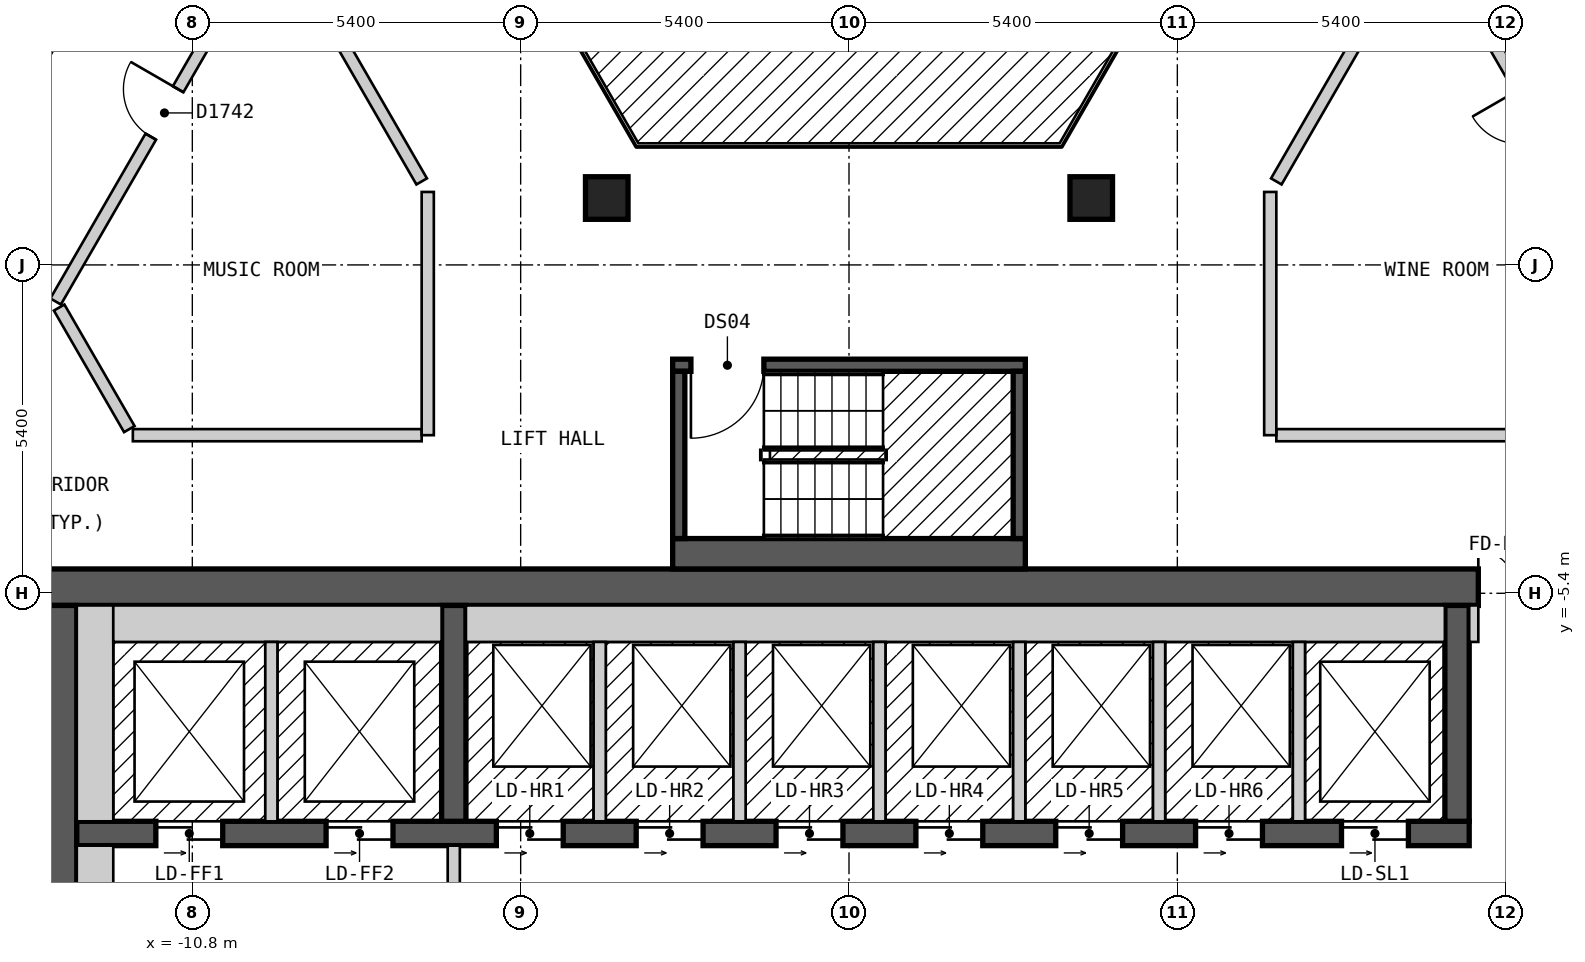
"""IFC4 building model, lengths in metres.
Left out: names, types, materials, properties, quantities, classifications, styles, units other than length and angle.
Written with IfcOpenShell. Run it as: python <this file> out.ifc"""

import sys

from ifc_helpers import new_model, si_unit, direction, frame, frame_2d, origin, origin_2d, place, context, subcontext, project, spatial, rectangle, extrude, element, fill, save


model = new_model("IFC4")
c1 = context("Model", 3, precision=1e-05, world=origin(), true_north=direction((0.0, 1.0)))
c2 = subcontext(c1, "Body", "Model", "MODEL_VIEW")
j1 = project(units=[si_unit("LENGTHUNIT", "METRE"), si_unit("PLANEANGLEUNIT", "RADIAN")], contexts=[c1])
p1 = place(None, origin())
s1 = spatial("IfcSite", under=j1, at=p1, CompositionType="ELEMENT")
p2 = place(p1, origin())
s2 = spatial("IfcBuilding", under=s1, at=p2, CompositionType="ELEMENT")
p3 = place(p2, frame((0.0, 0.0, 187.2)))
s3 = spatial("IfcBuildingStorey", under=s2, at=p3, CompositionType="ELEMENT", Elevation=187.2)
for number, where, z_axis, x_axis in (
    (1, (3.984, 1.1, 0.0), (0.0, 0.0, 1.0), (1.0, 0.0, 0.0)),
    (2, (-3.984, 1.1, 0.0), (0.0, 0.0, 1.0), (1.0, 0.0, 0.0)),
):
    element("IfcColumn", number, at=place(p3, frame(where, z_axis=z_axis, x_axis=x_axis)), inside=s3, PredefinedType="COLUMN", context=c2, shape_type="SweptSolid", body=[
        extrude(rectangle(XDim=0.7, YDim=0.7, at=origin_2d()), origin(), (0.0, 0.0, 1.0), 3.0),
    ])
p4 = place(p3, frame((-13.3, -5.3, 0.0), z_axis=(0.0, 0.0, 1.0), x_axis=(1.0, 0.0, 0.0)))
e3 = element("IfcWall", 3, at=p4, inside=s3, PredefinedType="SHEAR", context=c2, shape_type="SweptSolid", body=[
    extrude(rectangle(XDim=26.6, YDim=0.6, at=frame_2d((13.3, 0.0))), origin(), (0.0, 0.0, 1.0), 2.7),
])
p5 = place(p4, frame((23.65, 0.0, 0.0)))
e4 = element("IfcOpeningElement", 4, at=p5, cuts=e3, PredefinedType="OPENING", context=c2, shape_type="SweptSolid", body=[
    extrude(rectangle(XDim=1.2, YDim=2.1, at=frame_2d((0.6, 1.05))), frame((0.0, 0.31, 0.0), z_axis=(0.0, -1.0, 0.0), x_axis=(1.0, 0.0, 0.0)), (0.0, 0.0, 1.0), 0.62),
])
p6 = place(p3, frame((-13.0, -18.4, 0.0), z_axis=(0.0, 0.0, 1.0), x_axis=(0.0, 1.0, 0.0)))
e5 = element("IfcWall", 5, at=p6, inside=s3, PredefinedType="SHEAR", context=c2, shape_type="SweptSolid", body=[
    extrude(rectangle(XDim=12.8, YDim=0.6, at=frame_2d((6.4, 0.0))), origin(), (0.0, 0.0, 1.0), 2.7),
])
p7 = place(p6, frame((4.2, 0.0, 0.0)))
e6 = element("IfcOpeningElement", 6, at=p7, cuts=e5, PredefinedType="OPENING", context=c2, shape_type="SweptSolid", body=[
    extrude(rectangle(XDim=1.2, YDim=2.1, at=frame_2d((0.6, 1.05))), frame((0.0, 0.31, 0.0), z_axis=(0.0, -1.0, 0.0), x_axis=(1.0, 0.0, 0.0)), (0.0, 0.0, 1.0), 0.62),
])
p8 = place(p3, frame((-12.7, -9.35, 0.0), z_axis=(0.0, 0.0, 1.0), x_axis=(1.0, 0.0, 0.0)))
e7 = element("IfcWall", 7, at=p8, inside=s3, PredefinedType="SHEAR", context=c2, shape_type="SweptSolid", body=[
    extrude(rectangle(XDim=22.9, YDim=0.4, at=frame_2d((11.45, 0.0))), origin(), (0.0, 0.0, 1.0), 2.7),
])
p9 = place(p8, frame((1.3, 0.0, 0.0)))
e8 = element("IfcOpeningElement", 8, at=p9, cuts=e7, PredefinedType="OPENING", context=c2, shape_type="SweptSolid", body=[
    extrude(rectangle(XDim=1.1, YDim=2.1, at=frame_2d((0.55, 1.05))), frame((0.0, 0.21, 0.0), z_axis=(0.0, -1.0, 0.0), x_axis=(1.0, 0.0, 0.0)), (0.0, 0.0, 1.0), 0.42),
])
p10 = place(p8, frame((4.1, 0.0, 0.0)))
e9 = element("IfcOpeningElement", 9, at=p10, cuts=e7, PredefinedType="OPENING", context=c2, shape_type="SweptSolid", body=[
    extrude(rectangle(XDim=1.1, YDim=2.1, at=frame_2d((0.55, 1.05))), frame((0.0, 0.21, 0.0), z_axis=(0.0, -1.0, 0.0), x_axis=(1.0, 0.0, 0.0)), (0.0, 0.0, 1.0), 0.42),
])
p11 = place(p8, frame((6.9, 0.0, 0.0)))
e10 = element("IfcOpeningElement", 10, at=p11, cuts=e7, PredefinedType="OPENING", context=c2, shape_type="SweptSolid", body=[
    extrude(rectangle(XDim=1.1, YDim=2.1, at=frame_2d((0.55, 1.05))), frame((0.0, 0.21, 0.0), z_axis=(0.0, -1.0, 0.0), x_axis=(1.0, 0.0, 0.0)), (0.0, 0.0, 1.0), 0.42),
])
p12 = place(p8, frame((9.2, 0.0, 0.0)))
e11 = element("IfcOpeningElement", 11, at=p12, cuts=e7, PredefinedType="OPENING", context=c2, shape_type="SweptSolid", body=[
    extrude(rectangle(XDim=1.1, YDim=2.1, at=frame_2d((0.55, 1.05))), frame((0.0, 0.21, 0.0), z_axis=(0.0, -1.0, 0.0), x_axis=(1.0, 0.0, 0.0)), (0.0, 0.0, 1.0), 0.42),
])
p13 = place(p8, frame((11.5, 0.0, 0.0)))
e12 = element("IfcOpeningElement", 12, at=p13, cuts=e7, PredefinedType="OPENING", context=c2, shape_type="SweptSolid", body=[
    extrude(rectangle(XDim=1.1, YDim=2.1, at=frame_2d((0.55, 1.05))), frame((0.0, 0.21, 0.0), z_axis=(0.0, -1.0, 0.0), x_axis=(1.0, 0.0, 0.0)), (0.0, 0.0, 1.0), 0.42),
])
p14 = place(p8, frame((13.8, 0.0, 0.0)))
e13 = element("IfcOpeningElement", 13, at=p14, cuts=e7, PredefinedType="OPENING", context=c2, shape_type="SweptSolid", body=[
    extrude(rectangle(XDim=1.1, YDim=2.1, at=frame_2d((0.55, 1.05))), frame((0.0, 0.21, 0.0), z_axis=(0.0, -1.0, 0.0), x_axis=(1.0, 0.0, 0.0)), (0.0, 0.0, 1.0), 0.42),
])
p15 = place(p8, frame((16.1, 0.0, 0.0)))
e14 = element("IfcOpeningElement", 14, at=p15, cuts=e7, PredefinedType="OPENING", context=c2, shape_type="SweptSolid", body=[
    extrude(rectangle(XDim=1.1, YDim=2.1, at=frame_2d((0.55, 1.05))), frame((0.0, 0.21, 0.0), z_axis=(0.0, -1.0, 0.0), x_axis=(1.0, 0.0, 0.0)), (0.0, 0.0, 1.0), 0.42),
])
p16 = place(p8, frame((18.4, 0.0, 0.0)))
e15 = element("IfcOpeningElement", 15, at=p16, cuts=e7, PredefinedType="OPENING", context=c2, shape_type="SweptSolid", body=[
    extrude(rectangle(XDim=1.1, YDim=2.1, at=frame_2d((0.55, 1.05))), frame((0.0, 0.21, 0.0), z_axis=(0.0, -1.0, 0.0), x_axis=(1.0, 0.0, 0.0)), (0.0, 0.0, 1.0), 0.42),
])
p17 = place(p8, frame((20.8, 0.0, 0.0)))
e16 = element("IfcOpeningElement", 16, at=p17, cuts=e7, PredefinedType="OPENING", context=c2, shape_type="SweptSolid", body=[
    extrude(rectangle(XDim=1.1, YDim=2.1, at=frame_2d((0.55, 1.05))), frame((0.0, 0.21, 0.0), z_axis=(0.0, -1.0, 0.0), x_axis=(1.0, 0.0, 0.0)), (0.0, 0.0, 1.0), 0.42),
])
for number, where, z_axis, x_axis in (
    (17, (-6.5, -9.15, 0.0), (0.0, 0.0, 1.0), (0.0, 1.0, 0.0)),
    (18, (10.0, -9.15, 0.0), (0.0, 0.0, 1.0), (0.0, 1.0, 0.0)),
):
    element("IfcWall", number, at=place(p3, frame(where, z_axis=z_axis, x_axis=x_axis)), inside=s3, PredefinedType="SHEAR", context=c2, shape_type="SweptSolid", body=[
        extrude(rectangle(XDim=3.55, YDim=0.4, at=frame_2d((1.775, 0.0))), origin(), (0.0, 0.0, 1.0), 2.7),
    ])
p18 = place(p3, frame((-2.9, -4.75, 0.0), z_axis=(0.0, 0.0, 1.0), x_axis=(1.0, 0.0, 0.0)))
e19 = element("IfcWall", 19, at=p18, inside=s3, PredefinedType="SOLIDWALL", context=c2, shape_type="SweptSolid", body=[
    extrude(rectangle(XDim=5.8, YDim=0.5, at=frame_2d((2.9, 0.0))), origin(), (0.0, 0.0, 1.0), 2.7),
])
p19 = place(p3, frame((-2.9, -1.65, 0.0), z_axis=(0.0, 0.0, 1.0), x_axis=(1.0, 0.0, 0.0)))
e20 = element("IfcWall", 20, at=p19, inside=s3, PredefinedType="SOLIDWALL", context=c2, shape_type="SweptSolid", body=[
    extrude(rectangle(XDim=5.8, YDim=0.2, at=frame_2d((2.9, 0.0))), origin(), (0.0, 0.0, 1.0), 2.7),
])
p20 = place(p19, frame((0.3, 0.0, 0.0)))
e21 = element("IfcOpeningElement", 21, at=p20, cuts=e20, PredefinedType="OPENING", context=c2, shape_type="SweptSolid", body=[
    extrude(rectangle(XDim=1.2, YDim=2.1, at=frame_2d((0.6, 1.05))), frame((0.0, 0.11, 0.0), z_axis=(0.0, -1.0, 0.0), x_axis=(1.0, 0.0, 0.0)), (0.0, 0.0, 1.0), 0.22),
])
for number, where, z_axis, x_axis in (
    (22, (-2.8, -4.5, 0.0), (0.0, 0.0, 1.0), (0.0, 1.0, 0.0)),
    (23, (2.8, -4.5, 0.0), (0.0, 0.0, 1.0), (0.0, 1.0, 0.0)),
):
    element("IfcWall", number, at=place(p3, frame(where, z_axis=z_axis, x_axis=x_axis)), inside=s3, PredefinedType="SOLIDWALL", context=c2, shape_type="SweptSolid", body=[
        extrude(rectangle(XDim=2.75, YDim=0.2, at=frame_2d((1.375, 0.0))), origin(), (0.0, 0.0, 1.0), 2.7),
    ])
p21 = place(p3, frame((-9.411, 5.5, 0.0), z_axis=(0.0, 0.0, 1.0), x_axis=(0.500018099276, -0.86601495391, 0.0)))
e24 = element("IfcWall", 24, at=p21, inside=s3, PredefinedType="PARTITIONING", context=c2, shape_type="SweptSolid", body=[
    extrude(rectangle(XDim=4.765, YDim=0.2, at=frame_2d((2.383, 0.0))), origin(), (0.0, 0.0, 1.0), 2.7),
])
p22 = place(p3, frame((-12.99, -0.701, 0.0), z_axis=(0.0, 0.0, 1.0), x_axis=(0.499972710878, -0.866041158593, 0.0)))
e25 = element("IfcWall", 25, at=p22, inside=s3, PredefinedType="PARTITIONING", context=c2, shape_type="SweptSolid", body=[
    extrude(rectangle(XDim=2.308, YDim=0.2, at=frame_2d((1.154, 0.0))), origin(), (0.0, 0.0, 1.0), 2.7),
])
p23 = place(p3, frame((9.526, 5.5, 0.0), z_axis=(0.0, 0.0, 1.0), x_axis=(0.500062092869, -0.865989551482, 0.0)))
e26 = element("IfcWall", 26, at=p23, inside=s3, PredefinedType="PARTITIONING", context=c2, shape_type="SweptSolid", body=[
    extrude(rectangle(XDim=6.927, YDim=0.2, at=frame_2d((3.464, 0.0))), origin(), (0.0, 0.0, 1.0), 2.7),
])
p24 = place(p23, frame((3.014, 0.0, 0.0)))
e27 = element("IfcOpeningElement", 27, at=p24, cuts=e26, PredefinedType="OPENING", context=c2, shape_type="SweptSolid", body=[
    extrude(rectangle(XDim=0.9, YDim=2.1, at=frame_2d((0.45, 1.05))), frame((0.0, 0.11, 0.0), z_axis=(0.0, -1.0, 0.0), x_axis=(1.0, 0.0, 0.0)), (0.0, 0.0, 1.0), 0.22),
])
p25 = place(p3, frame((10.739, 7.8, 0.0), z_axis=(0.0, 0.0, 1.0), x_axis=(0.500023726918, -0.866011704609, 0.0)))
e28 = element("IfcWall", 28, at=p25, inside=s3, PredefinedType="PARTITIONING", context=c2, shape_type="SweptSolid", body=[
    extrude(rectangle(XDim=9.47, YDim=0.2, at=frame_2d((4.735, 0.0))), origin(), (0.0, 0.0, 1.0), 2.7),
])
p26 = place(p25, frame((8.168, 0.0, 0.0)))
e29 = element("IfcOpeningElement", 29, at=p26, cuts=e28, PredefinedType="OPENING", context=c2, shape_type="SweptSolid", body=[
    extrude(rectangle(XDim=1.0, YDim=2.1, at=frame_2d((0.5, 1.05))), frame((0.0, 0.11, 0.0), z_axis=(0.0, -1.0, 0.0), x_axis=(1.0, 0.0, 0.0)), (0.0, 0.0, 1.0), 0.22),
])
p27 = place(p3, frame((-11.778, -2.8, 0.0), z_axis=(0.0, 0.0, 1.0), x_axis=(1.0, 0.0, 0.0)))
e30 = element("IfcWall", 30, at=p27, inside=s3, PredefinedType="PARTITIONING", context=c2, shape_type="SweptSolid", body=[
    extrude(rectangle(XDim=4.75, YDim=0.2, at=frame_2d((2.375, 0.0))), origin(), (0.0, 0.0, 1.0), 2.7),
])
p28 = place(p3, frame((7.028, -2.8, 0.0), z_axis=(0.0, 0.0, 1.0), x_axis=(1.0, 0.0, 0.0)))
e31 = element("IfcWall", 31, at=p28, inside=s3, PredefinedType="PARTITIONING", context=c2, shape_type="SweptSolid", body=[
    extrude(rectangle(XDim=4.634, YDim=0.2, at=frame_2d((2.317, 0.0))), origin(), (0.0, 0.0, 1.0), 2.7),
])
p29 = place(p3, frame((7.028, 1.373, 0.0), z_axis=(0.0, 0.0, 1.0), x_axis=(0.500065924398, 0.86598733897, 0.0)))
e32 = element("IfcWall", 32, at=p29, inside=s3, PredefinedType="PARTITIONING", context=c2, shape_type="SweptSolid", body=[
    extrude(rectangle(XDim=4.881, YDim=0.2, at=frame_2d((2.44, 0.0))), origin(), (0.0, 0.0, 1.0), 2.7),
])
p30 = place(p3, frame((-13.048, -0.601, 0.0), z_axis=(0.0, 0.0, 1.0), x_axis=(0.499982180423, 0.866035691677, 0.0)))
e33 = element("IfcWall", 33, at=p30, inside=s3, PredefinedType="PARTITIONING", context=c2, shape_type="SweptSolid", body=[
    extrude(rectangle(XDim=7.16, YDim=0.2, at=frame_2d((3.58, 0.0))), origin(), (0.0, 0.0, 1.0), 2.7),
])
p31 = place(p30, frame((3.13, 0.0, 0.0)))
e34 = element("IfcOpeningElement", 34, at=p31, cuts=e33, PredefinedType="OPENING", context=c2, shape_type="SweptSolid", body=[
    extrude(rectangle(XDim=0.9, YDim=2.1, at=frame_2d((0.45, 1.05))), frame((0.0, 0.11, 0.0), z_axis=(0.0, -1.0, 0.0), x_axis=(1.0, 0.0, 0.0)), (0.0, 0.0, 1.0), 0.22),
])
p32 = place(p3, frame((-15.53, -0.501, 0.0), z_axis=(0.0, 0.0, 1.0), x_axis=(0.499952498232, 0.866052827206, 0.0)))
e35 = element("IfcWall", 35, at=p32, inside=s3, PredefinedType="PARTITIONING", context=c2, shape_type="SweptSolid", body=[
    extrude(rectangle(XDim=9.585, YDim=0.2, at=frame_2d((4.792, 0.0))), origin(), (0.0, 0.0, 1.0), 2.7),
])
p33 = place(p32, frame((0.525, 0.0, 0.0)))
e36 = element("IfcOpeningElement", 36, at=p33, cuts=e35, PredefinedType="OPENING", context=c2, shape_type="SweptSolid", body=[
    extrude(rectangle(XDim=1.0, YDim=2.1, at=frame_2d((0.5, 1.05))), frame((0.0, 0.11, 0.0), z_axis=(0.0, -1.0, 0.0), x_axis=(1.0, 0.0, 0.0)), (0.0, 0.0, 1.0), 0.22),
])
for number, where, z_axis, x_axis in (
    (37, (6.928, -2.8, 0.0), (0.0, 0.0, 1.0), (0.0, 1.0, 0.0)),
    (38, (-6.928, -2.8, 0.0), (0.0, 0.0, 1.0), (0.0, 1.0, 0.0)),
):
    element("IfcWall", number, at=place(p3, frame(where, z_axis=z_axis, x_axis=x_axis)), inside=s3, PredefinedType="PARTITIONING", context=c2, shape_type="SweptSolid", body=[
        extrude(rectangle(XDim=4.0, YDim=0.2, at=frame_2d((2.0, 0.0))), origin(), (0.0, 0.0, 1.0), 2.7),
    ])
p34 = place(p3, frame((-12.4, -13.0, 0.0), z_axis=(0.0, 0.0, 1.0), x_axis=(0.0, 1.0, 0.0)))
e39 = element("IfcWall", 39, at=p34, inside=s3, PredefinedType="PARTITIONING", context=c2, shape_type="SweptSolid", body=[
    extrude(rectangle(XDim=3.45, YDim=0.6, at=frame_2d((1.725, 0.0))), origin(), (0.0, 0.0, 1.0), 2.7),
])
p35 = place(p3, frame((-12.4, -9.15, 0.0), z_axis=(0.0, 0.0, 1.0), x_axis=(0.0, 1.0, 0.0)))
e40 = element("IfcWall", 40, at=p35, inside=s3, PredefinedType="SOLIDWALL", context=c2, shape_type="SweptSolid", body=[
    extrude(rectangle(XDim=3.55, YDim=0.6, at=frame_2d((1.775, 0.0))), origin(), (0.0, 0.0, 1.0), 2.7),
])
p36 = place(p3, frame((-12.1, -5.9, 0.0), z_axis=(0.0, 0.0, 1.0), x_axis=(1.0, 0.0, 0.0)))
e41 = element("IfcWall", 41, at=p36, inside=s3, PredefinedType="SOLIDWALL", context=c2, shape_type="SweptSolid", body=[
    extrude(rectangle(XDim=5.4, YDim=0.6, at=frame_2d((2.7, 0.0))), origin(), (0.0, 0.0, 1.0), 2.7),
])
p37 = place(p3, frame((-9.5, -9.15, 0.0), z_axis=(0.0, 0.0, 1.0), x_axis=(0.0, 1.0, 0.0)))
e42 = element("IfcWall", 42, at=p37, inside=s3, PredefinedType="SOLIDWALL", context=c2, shape_type="SweptSolid", body=[
    extrude(rectangle(XDim=2.95, YDim=0.2, at=frame_2d((1.475, 0.0))), origin(), (0.0, 0.0, 1.0), 2.7),
])
p38 = place(p3, frame((-6.5, -14.45, 0.0), z_axis=(0.0, 0.0, 1.0), x_axis=(0.0, 1.0, 0.0)))
e43 = element("IfcWall", 43, at=p38, inside=s3, PredefinedType="PARTITIONING", context=c2, shape_type="SweptSolid", body=[
    extrude(rectangle(XDim=4.9, YDim=0.2, at=frame_2d((2.45, 0.0))), origin(), (0.0, 0.0, 1.0), 2.7),
])
p39 = place(p38, frame((3.15, 0.0, 0.0), z_axis=(0.0, 0.0, 1.0), x_axis=(-1.0, 0.0, 0.0)))
e44 = element("IfcOpeningElement", 44, at=p39, cuts=e43, PredefinedType="OPENING", context=c2, shape_type="SweptSolid", body=[
    extrude(rectangle(XDim=1.4, YDim=2.1, at=frame_2d((0.7, 1.05))), frame((0.0, 0.11, 0.0), z_axis=(0.0, -1.0, 0.0), x_axis=(1.0, 0.0, 0.0)), (0.0, 0.0, 1.0), 0.22),
])
p40 = place(p3, frame((-6.3, -5.9, 0.0), z_axis=(0.0, 0.0, 1.0), x_axis=(1.0, 0.0, 0.0)))
e45 = element("IfcWall", 45, at=p40, inside=s3, PredefinedType="SOLIDWALL", context=c2, shape_type="SweptSolid", body=[
    extrude(rectangle(XDim=16.1, YDim=0.6, at=frame_2d((8.05, 0.0))), origin(), (0.0, 0.0, 1.0), 2.7),
])
for number, where, z_axis, x_axis in (
    (46, (-4.1, -9.15, 0.0), (0.0, 0.0, 1.0), (0.0, 1.0, 0.0)),
    (47, (-1.8, -9.15, 0.0), (0.0, 0.0, 1.0), (0.0, 1.0, 0.0)),
    (48, (0.5, -9.15, 0.0), (0.0, 0.0, 1.0), (0.0, 1.0, 0.0)),
    (49, (2.8, -9.15, 0.0), (0.0, 0.0, 1.0), (0.0, 1.0, 0.0)),
    (50, (5.1, -9.15, 0.0), (0.0, 0.0, 1.0), (0.0, 1.0, 0.0)),
    (51, (7.4, -9.15, 0.0), (0.0, 0.0, 1.0), (0.0, 1.0, 0.0)),
):
    element("IfcWall", number, at=place(p3, frame(where, z_axis=z_axis, x_axis=x_axis)), inside=s3, PredefinedType="SOLIDWALL", context=c2, shape_type="SweptSolid", body=[
        extrude(rectangle(XDim=2.95, YDim=0.2, at=frame_2d((1.475, 0.0))), origin(), (0.0, 0.0, 1.0), 2.7),
    ])
p41 = place(p3, frame((10.275, -6.2, 0.0), z_axis=(0.0, 0.0, 1.0), x_axis=(0.0, 1.0, 0.0)))
e52 = element("IfcWall", 52, at=p41, inside=s3, PredefinedType="PARTITIONING", context=c2, shape_type="SweptSolid", body=[
    extrude(rectangle(XDim=0.6, YDim=0.15, at=frame_2d((0.3, 0.0))), origin(), (0.0, 0.0, 1.0), 2.7),
])
p42 = place(p20, origin())
e53 = element("IfcDoor", 53, at=p42, inside=s3, OperationType="SINGLE_SWING_LEFT", PredefinedType="DOOR", context=c2, shape_type="SweptSolid", body=[
    extrude(rectangle(XDim=1.2, YDim=2.1, at=frame_2d((0.6, 1.05))), frame((0.0, 0.025, 0.0), z_axis=(0.0, -1.0, 0.0), x_axis=(1.0, 0.0, 0.0)), (0.0, 0.0, 1.0), 0.05),
])
fill(e21, e53)
p43 = place(p31, origin())
e54 = element("IfcDoor", 54, at=p43, inside=s3, OperationType="SINGLE_SWING_RIGHT", PredefinedType="DOOR", context=c2, shape_type="SweptSolid", body=[
    extrude(rectangle(XDim=0.9, YDim=2.1, at=frame_2d((0.45, 1.05))), frame((0.0, 0.025, 0.0), z_axis=(0.0, -1.0, 0.0), x_axis=(1.0, 0.0, 0.0)), (0.0, 0.0, 1.0), 0.05),
])
fill(e34, e54)
p44 = place(p9, origin())
e55 = element("IfcDoor", 55, at=p44, inside=s3, OperationType="DOUBLE_DOOR_SLIDING", PredefinedType="DOOR", context=c2, shape_type="SweptSolid", body=[
    extrude(rectangle(XDim=1.1, YDim=2.1, at=frame_2d((0.55, 1.05))), frame((0.0, 0.025, 0.0), z_axis=(0.0, -1.0, 0.0), x_axis=(1.0, 0.0, 0.0)), (0.0, 0.0, 1.0), 0.05),
])
fill(e8, e55)
p45 = place(p10, origin())
e56 = element("IfcDoor", 56, at=p45, inside=s3, OperationType="DOUBLE_DOOR_SLIDING", PredefinedType="DOOR", context=c2, shape_type="SweptSolid", body=[
    extrude(rectangle(XDim=1.1, YDim=2.1, at=frame_2d((0.55, 1.05))), frame((0.0, 0.025, 0.0), z_axis=(0.0, -1.0, 0.0), x_axis=(1.0, 0.0, 0.0)), (0.0, 0.0, 1.0), 0.05),
])
fill(e9, e56)
p46 = place(p11, origin())
e57 = element("IfcDoor", 57, at=p46, inside=s3, OperationType="DOUBLE_DOOR_SLIDING", PredefinedType="DOOR", context=c2, shape_type="SweptSolid", body=[
    extrude(rectangle(XDim=1.1, YDim=2.1, at=frame_2d((0.55, 1.05))), frame((0.0, 0.025, 0.0), z_axis=(0.0, -1.0, 0.0), x_axis=(1.0, 0.0, 0.0)), (0.0, 0.0, 1.0), 0.05),
])
fill(e10, e57)
p47 = place(p12, origin())
e58 = element("IfcDoor", 58, at=p47, inside=s3, OperationType="DOUBLE_DOOR_SLIDING", PredefinedType="DOOR", context=c2, shape_type="SweptSolid", body=[
    extrude(rectangle(XDim=1.1, YDim=2.1, at=frame_2d((0.55, 1.05))), frame((0.0, 0.025, 0.0), z_axis=(0.0, -1.0, 0.0), x_axis=(1.0, 0.0, 0.0)), (0.0, 0.0, 1.0), 0.05),
])
fill(e11, e58)
p48 = place(p13, origin())
e59 = element("IfcDoor", 59, at=p48, inside=s3, OperationType="DOUBLE_DOOR_SLIDING", PredefinedType="DOOR", context=c2, shape_type="SweptSolid", body=[
    extrude(rectangle(XDim=1.1, YDim=2.1, at=frame_2d((0.55, 1.05))), frame((0.0, 0.025, 0.0), z_axis=(0.0, -1.0, 0.0), x_axis=(1.0, 0.0, 0.0)), (0.0, 0.0, 1.0), 0.05),
])
fill(e12, e59)
p49 = place(p14, origin())
e60 = element("IfcDoor", 60, at=p49, inside=s3, OperationType="DOUBLE_DOOR_SLIDING", PredefinedType="DOOR", context=c2, shape_type="SweptSolid", body=[
    extrude(rectangle(XDim=1.1, YDim=2.1, at=frame_2d((0.55, 1.05))), frame((0.0, 0.025, 0.0), z_axis=(0.0, -1.0, 0.0), x_axis=(1.0, 0.0, 0.0)), (0.0, 0.0, 1.0), 0.05),
])
fill(e13, e60)
p50 = place(p15, origin())
e61 = element("IfcDoor", 61, at=p50, inside=s3, OperationType="DOUBLE_DOOR_SLIDING", PredefinedType="DOOR", context=c2, shape_type="SweptSolid", body=[
    extrude(rectangle(XDim=1.1, YDim=2.1, at=frame_2d((0.55, 1.05))), frame((0.0, 0.025, 0.0), z_axis=(0.0, -1.0, 0.0), x_axis=(1.0, 0.0, 0.0)), (0.0, 0.0, 1.0), 0.05),
])
fill(e14, e61)
p51 = place(p16, origin())
e62 = element("IfcDoor", 62, at=p51, inside=s3, OperationType="DOUBLE_DOOR_SLIDING", PredefinedType="DOOR", context=c2, shape_type="SweptSolid", body=[
    extrude(rectangle(XDim=1.1, YDim=2.1, at=frame_2d((0.55, 1.05))), frame((0.0, 0.025, 0.0), z_axis=(0.0, -1.0, 0.0), x_axis=(1.0, 0.0, 0.0)), (0.0, 0.0, 1.0), 0.05),
])
fill(e15, e62)
p52 = place(p17, origin())
e63 = element("IfcDoor", 63, at=p52, inside=s3, OperationType="DOUBLE_DOOR_SLIDING", PredefinedType="DOOR", context=c2, shape_type="SweptSolid", body=[
    extrude(rectangle(XDim=1.1, YDim=2.1, at=frame_2d((0.55, 1.05))), frame((0.0, 0.025, 0.0), z_axis=(0.0, -1.0, 0.0), x_axis=(1.0, 0.0, 0.0)), (0.0, 0.0, 1.0), 0.05),
])
fill(e16, e63)
p53 = place(p5, origin())
e64 = element("IfcDoor", 64, at=p53, inside=s3, OperationType="DOUBLE_DOOR_SINGLE_SWING", PredefinedType="DOOR", context=c2, shape_type="SweptSolid", body=[
    extrude(rectangle(XDim=1.2, YDim=2.1, at=frame_2d((0.6, 1.05))), frame((0.0, 0.025, 0.0), z_axis=(0.0, -1.0, 0.0), x_axis=(1.0, 0.0, 0.0)), (0.0, 0.0, 1.0), 0.05),
])
fill(e4, e64)
save(model, sys.argv[1])
